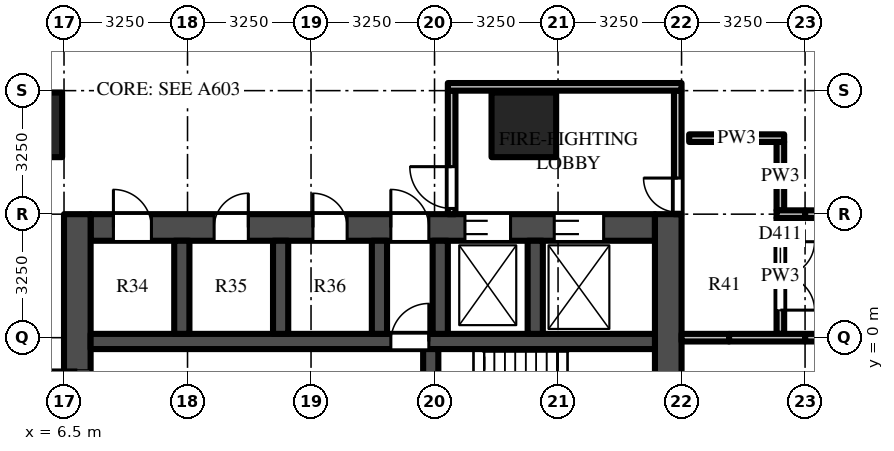
"""IFC4 building model, lengths in metres.
Left out: names, types, materials, properties, quantities, classifications, styles, units other than length and angle.
Written with IfcOpenShell. Run it as: python <this file> out.ifc"""

import sys

from ifc_helpers import new_model, si_unit, direction, frame, frame_2d, origin, origin_2d, place, context, subcontext, project, spatial, rectangle, extrude, source, transform, mapped, element, fill, save


model = new_model("IFC4")
c1 = context("Model", 3, precision=1e-05, world=origin(), true_north=direction((0.0, 1.0)))
c2 = subcontext(c1, "Body", "Model", "MODEL_VIEW")
j1 = project(units=[si_unit("LENGTHUNIT", "METRE"), si_unit("PLANEANGLEUNIT", "RADIAN")], contexts=[c1])
p1 = place(None, origin())
s1 = spatial("IfcSite", under=j1, at=p1, CompositionType="ELEMENT")
p2 = place(p1, origin())
s2 = spatial("IfcBuilding", under=s1, at=p2, CompositionType="ELEMENT")
p3 = place(p2, frame((0.0, 0.0, 14.0)))
s3 = spatial("IfcBuildingStorey", under=s2, at=p3, CompositionType="ELEMENT", Elevation=14.0)
m1 = source(origin(), c2, "Body", "SweptSolid", [
    extrude(rectangle(XDim=1.7, YDim=1.7, at=origin_2d()), origin(), (0.0, 0.0, 1.0), 5.0),
])
for number, where, z_axis, x_axis in (
    (1, (5.6, 5.6, 0.0), (0.0, 0.0, 1.0), (1.0, 0.0, 0.0)),
    (2, (18.6, 5.6, 0.0), (0.0, 0.0, 1.0), (1.0, 0.0, 0.0)),
):
    element("IfcColumn", number, at=place(p3, frame(where, z_axis=z_axis, x_axis=x_axis)), inside=s3, PredefinedType="COLUMN", context=c2, shape_type="MappedRepresentation", body=[
        mapped(m1, transform((0.0, 0.0, 0.0))),
    ])
m2 = source(origin(), c2, "Body", "SweptSolid", [
    extrude(rectangle(XDim=14.85, YDim=0.7, at=frame_2d((7.425, 0.0))), origin(), (0.0, 0.0, 1.0), 4.7),
])
p4 = place(p3, frame((7.2, 2.9, 0.0), z_axis=(0.0, 0.0, 1.0), x_axis=(1.0, 0.0, 0.0)))
e3 = element("IfcWall", 3, at=p4, inside=s3, PredefinedType="SHEAR", context=c2, shape_type="MappedRepresentation", body=[
    mapped(m2, transform((0.0, 0.0, 0.0))),
])
m3 = source(origin(), c2, "Body", "SweptSolid", [
    extrude(rectangle(XDim=1.3, YDim=2.1, at=frame_2d((0.65, 1.05))), frame((0.0, 0.36, 0.0), z_axis=(0.0, -1.0, 0.0), x_axis=(1.0, 0.0, 0.0)), (0.0, 0.0, 1.0), 0.72),
])
p5 = place(p4, frame((12.2, 0.0, 0.0)))
e4 = element("IfcOpeningElement", 4, at=p5, cuts=e3, PredefinedType="OPENING", context=c2, shape_type="MappedRepresentation", body=[
    mapped(m3, transform((0.0, 0.0, 0.0))),
])
m4 = source(origin(), c2, "Body", "SweptSolid", [
    extrude(rectangle(XDim=1.2, YDim=2.1, at=frame_2d((0.6, 1.05))), frame((0.0, 0.36, 0.0), z_axis=(0.0, -1.0, 0.0), x_axis=(1.0, 0.0, 0.0)), (0.0, 0.0, 1.0), 0.72),
])
p6 = place(p4, frame((9.85, 0.0, 0.0)))
e5 = element("IfcOpeningElement", 5, at=p6, cuts=e3, PredefinedType="OPENING", context=c2, shape_type="MappedRepresentation", body=[
    mapped(m4, transform((0.0, 0.0, 0.0))),
])
m5 = source(origin(), c2, "Body", "SweptSolid", [
    extrude(rectangle(XDim=1.0, YDim=2.1, at=frame_2d((0.5, 1.05))), frame((0.0, 0.36, 0.0), z_axis=(0.0, -1.0, 0.0), x_axis=(1.0, 0.0, 0.0)), (0.0, 0.0, 1.0), 0.72),
])
p7 = place(p4, frame((7.9, 0.0, 0.0)))
e6 = element("IfcOpeningElement", 6, at=p7, cuts=e3, PredefinedType="OPENING", context=c2, shape_type="MappedRepresentation", body=[
    mapped(m5, transform((0.0, 0.0, 0.0))),
])
p8 = place(p4, frame((0.6, 0.0, 0.0)))
e7 = element("IfcOpeningElement", 7, at=p8, cuts=e3, PredefinedType="OPENING", context=c2, shape_type="MappedRepresentation", body=[
    mapped(m5, transform((0.0, 0.0, 0.0))),
])
m6 = source(origin(), c2, "Body", "SweptSolid", [
    extrude(rectangle(XDim=0.9, YDim=2.1, at=frame_2d((0.45, 1.05))), frame((0.0, 0.36, 0.0), z_axis=(0.0, -1.0, 0.0), x_axis=(1.0, 0.0, 0.0)), (0.0, 0.0, 1.0), 0.72),
])
p9 = place(p4, frame((3.25, 0.0, 0.0)))
e8 = element("IfcOpeningElement", 8, at=p9, cuts=e3, PredefinedType="OPENING", context=c2, shape_type="MappedRepresentation", body=[
    mapped(m6, transform((0.0, 0.0, 0.0))),
])
p10 = place(p4, frame((5.85, 0.0, 0.0)))
e9 = element("IfcOpeningElement", 9, at=p10, cuts=e3, PredefinedType="OPENING", context=c2, shape_type="MappedRepresentation", body=[
    mapped(m6, transform((0.0, 0.0, 0.0))),
])
m7 = source(origin(), c2, "Body", "SweptSolid", [
    extrude(rectangle(XDim=9.05, YDim=0.7, at=frame_2d((4.525, 0.0))), origin(), (0.0, 0.0, 1.0), 4.7),
])
p11 = place(p3, frame((6.85, -5.8, 0.0), z_axis=(0.0, 0.0, 1.0), x_axis=(0.0, 1.0, 0.0)))
e10 = element("IfcWall", 10, at=p11, inside=s3, PredefinedType="SHEAR", context=c2, shape_type="MappedRepresentation", body=[
    mapped(m7, transform((0.0, 0.0, 0.0))),
])
m8 = source(origin(), c2, "Body", "SweptSolid", [
    extrude(rectangle(XDim=1.8, YDim=2.1, at=frame_2d((0.9, 1.05))), frame((0.0, 0.36, 0.0), z_axis=(0.0, -1.0, 0.0), x_axis=(1.0, 0.0, 0.0)), (0.0, 0.0, 1.0), 0.72),
])
p12 = place(p11, frame((3.15, 0.0, 0.0)))
e11 = element("IfcOpeningElement", 11, at=p12, cuts=e10, PredefinedType="OPENING", context=c2, shape_type="MappedRepresentation", body=[
    mapped(m8, transform((0.0, 0.0, 0.0))),
])
p13 = place(p3, frame((22.4, -5.8, 0.0), z_axis=(0.0, 0.0, 1.0), x_axis=(0.0, 1.0, 0.0)))
e12 = element("IfcWall", 12, at=p13, inside=s3, PredefinedType="SHEAR", context=c2, shape_type="MappedRepresentation", body=[
    mapped(m7, transform((0.0, 0.0, 0.0))),
])
m9 = source(origin(), c2, "Body", "SweptSolid", [
    extrude(rectangle(XDim=14.85, YDim=0.4, at=frame_2d((7.425, 0.0))), origin(), (0.0, 0.0, 1.0), 4.7),
])
p14 = place(p3, frame((7.2, -0.1, 0.0), z_axis=(0.0, 0.0, 1.0), x_axis=(1.0, 0.0, 0.0)))
e13 = element("IfcWall", 13, at=p14, inside=s3, PredefinedType="SHEAR", context=c2, shape_type="MappedRepresentation", body=[
    mapped(m9, transform((0.0, 0.0, 0.0))),
])
m10 = source(origin(), c2, "Body", "SweptSolid", [
    extrude(rectangle(XDim=1.0, YDim=2.1, at=frame_2d((0.5, 1.05))), frame((0.0, 0.21, 0.0), z_axis=(0.0, -1.0, 0.0), x_axis=(1.0, 0.0, 0.0)), (0.0, 0.0, 1.0), 0.42),
])
p15 = place(p14, frame((7.9, 0.0, 0.0)))
e14 = element("IfcOpeningElement", 14, at=p15, cuts=e13, PredefinedType="OPENING", context=c2, shape_type="MappedRepresentation", body=[
    mapped(m10, transform((0.0, 0.0, 0.0))),
])
m11 = source(origin(), c2, "Body", "SweptSolid", [
    extrude(rectangle(XDim=5.5, YDim=0.4, at=frame_2d((2.75, 0.0))), origin(), (0.0, 0.0, 1.0), 4.7),
])
p16 = place(p3, frame((16.15, -5.8, 0.0), z_axis=(0.0, 0.0, 1.0), x_axis=(0.0, 1.0, 0.0)))
e15 = element("IfcWall", 15, at=p16, inside=s3, PredefinedType="SHEAR", context=c2, shape_type="MappedRepresentation", body=[
    mapped(m11, transform((0.0, 0.0, 0.0))),
])
m12 = source(origin(), c2, "Body", "SweptSolid", [
    extrude(rectangle(XDim=1.1, YDim=2.1, at=frame_2d((0.55, 1.05))), frame((0.0, 0.21, 0.0), z_axis=(0.0, -1.0, 0.0), x_axis=(1.0, 0.0, 0.0)), (0.0, 0.0, 1.0), 0.42),
])
p17 = place(p16, frame((0.725, 0.0, 0.0)))
e16 = element("IfcOpeningElement", 16, at=p17, cuts=e15, PredefinedType="OPENING", context=c2, shape_type="MappedRepresentation", body=[
    mapped(m12, transform((0.0, 0.0, 0.0))),
])
p18 = place(p16, frame((3.675, 0.0, 0.0)))
e17 = element("IfcOpeningElement", 17, at=p18, cuts=e15, PredefinedType="OPENING", context=c2, shape_type="MappedRepresentation", body=[
    mapped(m12, transform((0.0, 0.0, 0.0))),
])
m13 = source(origin(), c2, "Body", "SweptSolid", [
    extrude(rectangle(XDim=2.45, YDim=0.4, at=frame_2d((1.225, 0.0))), origin(), (0.0, 0.0, 1.0), 4.7),
])
for number, where, z_axis, x_axis in (
    (18, (9.6, 0.1, 0.0), (0.0, 0.0, 1.0), (0.0, 1.0, 0.0)),
    (19, (12.2, 0.1, 0.0), (0.0, 0.0, 1.0), (0.0, 1.0, 0.0)),
    (20, (14.8, 0.1, 0.0), (0.0, 0.0, 1.0), (0.0, 1.0, 0.0)),
    (21, (16.4, 0.1, 0.0), (0.0, 0.0, 1.0), (0.0, 1.0, 0.0)),
    (22, (18.9, 0.1, 0.0), (0.0, 0.0, 1.0), (0.0, 1.0, 0.0)),
):
    element("IfcWall", number, at=place(p3, frame(where, z_axis=z_axis, x_axis=x_axis)), inside=s3, PredefinedType="SHEAR", context=c2, shape_type="MappedRepresentation", body=[
        mapped(m13, transform((0.0, 0.0, 0.0))),
    ])
m14 = source(origin(), c2, "Body", "SweptSolid", [
    extrude(rectangle(XDim=3.25, YDim=0.2, at=frame_2d((1.625, 0.0))), origin(), (0.0, 0.0, 1.0), 4.7),
])
p19 = place(p3, frame((16.7, 3.25, 0.0), z_axis=(0.0, 0.0, 1.0), x_axis=(0.0, 1.0, 0.0)))
e23 = element("IfcWall", 23, at=p19, inside=s3, PredefinedType="PARTITIONING", context=c2, shape_type="MappedRepresentation", body=[
    mapped(m14, transform((0.0, 0.0, 0.0))),
])
m15 = source(origin(), c2, "Body", "SweptSolid", [
    extrude(rectangle(XDim=1.1, YDim=2.1, at=frame_2d((0.55, 1.05))), frame((0.0, 0.11, 0.0), z_axis=(0.0, -1.0, 0.0), x_axis=(1.0, 0.0, 0.0)), (0.0, 0.0, 1.0), 0.22),
])
p20 = place(p19, frame((0.15, 0.0, 0.0)))
e24 = element("IfcOpeningElement", 24, at=p20, cuts=e23, PredefinedType="OPENING", context=c2, shape_type="MappedRepresentation", body=[
    mapped(m15, transform((0.0, 0.0, 0.0))),
])
p21 = place(p3, frame((22.65, 3.25, 0.0), z_axis=(0.0, 0.0, 1.0), x_axis=(0.0, 1.0, 0.0)))
e25 = element("IfcWall", 25, at=p21, inside=s3, PredefinedType="PARTITIONING", context=c2, shape_type="MappedRepresentation", body=[
    mapped(m14, transform((0.0, 0.0, 0.0))),
])
m16 = source(origin(), c2, "Body", "SweptSolid", [
    extrude(rectangle(XDim=0.9, YDim=2.1, at=frame_2d((0.45, 1.05))), frame((0.0, 0.11, 0.0), z_axis=(0.0, -1.0, 0.0), x_axis=(1.0, 0.0, 0.0)), (0.0, 0.0, 1.0), 0.22),
])
p22 = place(p21, frame((0.05, 0.0, 0.0)))
e26 = element("IfcOpeningElement", 26, at=p22, cuts=e25, PredefinedType="OPENING", context=c2, shape_type="MappedRepresentation", body=[
    mapped(m16, transform((0.0, 0.0, 0.0))),
])
m17 = source(origin(), c2, "Body", "SweptSolid", [
    extrude(rectangle(XDim=6.15, YDim=0.2, at=frame_2d((3.075, 0.0))), origin(), (0.0, 0.0, 1.0), 4.7),
])
p23 = place(p3, frame((16.6, 6.6, 0.0), z_axis=(0.0, 0.0, 1.0), x_axis=(1.0, 0.0, 0.0)))
e27 = element("IfcWall", 27, at=p23, inside=s3, PredefinedType="PARTITIONING", context=c2, shape_type="MappedRepresentation", body=[
    mapped(m17, transform((0.0, 0.0, 0.0))),
])
m18 = source(origin(), c2, "Body", "SweptSolid", [
    extrude(rectangle(XDim=3.05, YDim=0.2, at=frame_2d((1.525, 0.0))), origin(), (0.0, 0.0, 1.0), 4.077),
])
p24 = place(p3, frame((25.35, 3.15, 0.0), z_axis=(0.0, 0.0, 1.0), x_axis=(0.0, -1.0, 0.0)))
e28 = element("IfcWall", 28, at=p24, inside=s3, PredefinedType="PARTITIONING", context=c2, shape_type="MappedRepresentation", body=[
    mapped(m18, transform((0.0, 0.0, 0.0))),
])
m19 = source(origin(), c2, "Body", "SweptSolid", [
    extrude(rectangle(XDim=1.8, YDim=2.1, at=frame_2d((0.9, 1.05))), frame((0.0, 0.11, 0.0), z_axis=(0.0, -1.0, 0.0), x_axis=(1.0, 0.0, 0.0)), (0.0, 0.0, 1.0), 0.22),
])
p25 = place(p24, frame((0.625, 0.0, 0.0)))
e29 = element("IfcOpeningElement", 29, at=p25, cuts=e28, PredefinedType="OPENING", context=c2, shape_type="MappedRepresentation", body=[
    mapped(m19, transform((0.0, 0.0, 0.0))),
])
m20 = source(origin(), c2, "Body", "SweptSolid", [
    extrude(rectangle(XDim=1.8, YDim=0.2, at=frame_2d((0.9, 0.0))), origin(), (0.0, 0.0, 1.0), 4.7),
])
p26 = place(p3, frame((25.35, 3.35, 0.0), z_axis=(0.0, 0.0, 1.0), x_axis=(0.0, 1.0, 0.0)))
e30 = element("IfcWall", 30, at=p26, inside=s3, PredefinedType="PARTITIONING", context=c2, shape_type="MappedRepresentation", body=[
    mapped(m20, transform((0.0, 0.0, 0.0))),
])
m21 = source(origin(), c2, "Body", "SweptSolid", [
    extrude(rectangle(XDim=1.25, YDim=0.2, at=frame_2d((0.625, 0.0))), origin(), (0.0, 0.0, 1.0), 4.077),
])
p27 = place(p3, frame((22.75, 0.0, 0.0), z_axis=(0.0, 0.0, 1.0), x_axis=(1.0, 0.0, 0.0)))
e31 = element("IfcWall", 31, at=p27, inside=s3, PredefinedType="PARTITIONING", context=c2, shape_type="MappedRepresentation", body=[
    mapped(m21, transform((0.0, 0.0, 0.0))),
])
m22 = source(origin(), c2, "Body", "SweptSolid", [
    extrude(rectangle(XDim=3.25, YDim=0.2, at=frame_2d((1.625, 0.0))), origin(), (0.0, 0.0, 1.0), 4.077),
])
p28 = place(p3, frame((29.25, 0.0, 0.0), z_axis=(0.0, 0.0, 1.0), x_axis=(-1.0, 0.0, 0.0)))
e32 = element("IfcWall", 32, at=p28, inside=s3, PredefinedType="PARTITIONING", context=c2, shape_type="MappedRepresentation", body=[
    mapped(m22, transform((0.0, 0.0, 0.0))),
])
p29 = place(p28, frame((0.725, 0.0, 0.0)))
e33 = element("IfcOpeningElement", 33, at=p29, cuts=e32, PredefinedType="OPENING", context=c2, shape_type="MappedRepresentation", body=[
    mapped(m19, transform((0.0, 0.0, 0.0))),
])
m23 = source(origin(), c2, "Body", "SweptSolid", [
    extrude(rectangle(XDim=2.0, YDim=0.2, at=frame_2d((1.0, 0.0))), origin(), (0.0, 0.0, 1.0), 4.077),
])
p30 = place(p3, frame((26.0, 0.0, 0.0), z_axis=(0.0, 0.0, 1.0), x_axis=(-1.0, 0.0, 0.0)))
e34 = element("IfcWall", 34, at=p30, inside=s3, PredefinedType="PARTITIONING", context=c2, shape_type="MappedRepresentation", body=[
    mapped(m23, transform((0.0, 0.0, 0.0))),
])
p31 = place(p3, frame((26.0, 3.25, 0.0), z_axis=(0.0, 0.0, 1.0), x_axis=(1.0, 0.0, 0.0)))
e35 = element("IfcWall", 35, at=p31, inside=s3, PredefinedType="PARTITIONING", context=c2, shape_type="MappedRepresentation", body=[
    mapped(m14, transform((0.0, 0.0, 0.0))),
])
p32 = place(p31, frame((0.725, 0.0, 0.0)))
e36 = element("IfcOpeningElement", 36, at=p32, cuts=e35, PredefinedType="OPENING", context=c2, shape_type="MappedRepresentation", body=[
    mapped(m19, transform((0.0, 0.0, 0.0))),
])
m24 = source(origin(), c2, "Body", "SweptSolid", [
    extrude(rectangle(XDim=0.75, YDim=0.2, at=frame_2d((0.375, 0.0))), origin(), (0.0, 0.0, 1.0), 4.7),
])
p33 = place(p3, frame((25.25, 3.25, 0.0), z_axis=(0.0, 0.0, 1.0), x_axis=(1.0, 0.0, 0.0)))
e37 = element("IfcWall", 37, at=p33, inside=s3, PredefinedType="PARTITIONING", context=c2, shape_type="MappedRepresentation", body=[
    mapped(m24, transform((0.0, 0.0, 0.0))),
])
m25 = source(origin(), c2, "Body", "SweptSolid", [
    extrude(rectangle(XDim=1.05, YDim=0.2, at=frame_2d((0.525, 0.0))), origin(), (0.0, 0.0, 1.0), 4.7),
])
p34 = place(p3, frame((22.95, 5.25, 0.0), z_axis=(0.0, 0.0, 1.0), x_axis=(1.0, 0.0, 0.0)))
e38 = element("IfcWall", 38, at=p34, inside=s3, PredefinedType="PARTITIONING", context=c2, shape_type="MappedRepresentation", body=[
    mapped(m25, transform((0.0, 0.0, 0.0))),
])
m26 = source(origin(), c2, "Body", "SweptSolid", [
    extrude(rectangle(XDim=1.45, YDim=0.2, at=frame_2d((0.725, 0.0))), origin(), (0.0, 0.0, 1.0), 4.7),
])
p35 = place(p3, frame((24.0, 5.25, 0.0), z_axis=(0.0, 0.0, 1.0), x_axis=(1.0, 0.0, 0.0)))
e39 = element("IfcWall", 39, at=p35, inside=s3, PredefinedType="PARTITIONING", context=c2, shape_type="MappedRepresentation", body=[
    mapped(m26, transform((0.0, 0.0, 0.0))),
])
m27 = source(origin(), c2, "Body", "SweptSolid", [
    extrude(rectangle(XDim=1.3, YDim=2.1, at=frame_2d((0.65, 1.05))), frame((0.0, -0.275, 0.0), z_axis=(0.0, -1.0, 0.0), x_axis=(1.0, 0.0, 0.0)), (0.0, 0.0, 1.0), 0.05),
])
p36 = place(p5, origin())
e40 = element("IfcDoor", 40, at=p36, inside=s3, OperationType="DOUBLE_DOOR_SLIDING", PredefinedType="DOOR", context=c2, shape_type="MappedRepresentation", body=[
    mapped(m27, transform((0.0, 0.0, 0.0))),
])
fill(e4, e40)
m28 = source(origin(), c2, "Body", "SweptSolid", [
    extrude(rectangle(XDim=1.2, YDim=2.1, at=frame_2d((0.6, 1.05))), frame((0.0, -0.275, 0.0), z_axis=(0.0, -1.0, 0.0), x_axis=(1.0, 0.0, 0.0)), (0.0, 0.0, 1.0), 0.05),
])
p37 = place(p6, origin())
e41 = element("IfcDoor", 41, at=p37, inside=s3, OperationType="DOUBLE_DOOR_SLIDING", PredefinedType="DOOR", context=c2, shape_type="MappedRepresentation", body=[
    mapped(m28, transform((0.0, 0.0, 0.0))),
])
fill(e5, e41)
m29 = source(origin(), c2, "Body", "SweptSolid", [
    extrude(rectangle(XDim=1.8, YDim=2.1, at=frame_2d((0.9, 1.05))), frame((0.0, -0.275, 0.0), z_axis=(0.0, -1.0, 0.0), x_axis=(1.0, 0.0, 0.0)), (0.0, 0.0, 1.0), 0.05),
])
p38 = place(p12, origin())
e42 = element("IfcDoor", 42, at=p38, inside=s3, OperationType="DOUBLE_DOOR_SINGLE_SWING", PredefinedType="DOOR", context=c2, shape_type="MappedRepresentation", body=[
    mapped(m29, transform((0.0, 0.0, 0.0))),
])
fill(e11, e42)
m30 = source(origin(), c2, "Body", "SweptSolid", [
    extrude(rectangle(XDim=1.0, YDim=2.1, at=frame_2d((0.5, 1.05))), frame((0.0, 0.025, 0.0), z_axis=(0.0, -1.0, 0.0), x_axis=(1.0, 0.0, 0.0)), (0.0, 0.0, 1.0), 0.05),
])
p39 = place(p15, origin())
e43 = element("IfcDoor", 43, at=p39, inside=s3, OperationType="SINGLE_SWING_RIGHT", PredefinedType="DOOR", context=c2, shape_type="MappedRepresentation", body=[
    mapped(m30, transform((0.0, 0.0, 0.0))),
])
fill(e14, e43)
m31 = source(origin(), c2, "Body", "SweptSolid", [
    extrude(rectangle(XDim=1.0, YDim=2.1, at=frame_2d((0.5, 1.05))), frame((0.0, -0.275, 0.0), z_axis=(0.0, -1.0, 0.0), x_axis=(1.0, 0.0, 0.0)), (0.0, 0.0, 1.0), 0.05),
])
p40 = place(p7, origin())
e44 = element("IfcDoor", 44, at=p40, inside=s3, OperationType="SINGLE_SWING_LEFT", PredefinedType="DOOR", context=c2, shape_type="MappedRepresentation", body=[
    mapped(m31, transform((0.0, 0.0, 0.0))),
])
fill(e6, e44)
m32 = source(origin(), c2, "Body", "SweptSolid", [
    extrude(rectangle(XDim=1.1, YDim=2.1, at=frame_2d((0.55, 1.05))), frame((0.0, 0.025, 0.0), z_axis=(0.0, -1.0, 0.0), x_axis=(1.0, 0.0, 0.0)), (0.0, 0.0, 1.0), 0.05),
])
p41 = place(p20, origin())
e45 = element("IfcDoor", 45, at=p41, inside=s3, OperationType="SINGLE_SWING_RIGHT", PredefinedType="DOOR", context=c2, shape_type="MappedRepresentation", body=[
    mapped(m32, transform((0.0, 0.0, 0.0))),
])
fill(e24, e45)
m33 = source(origin(), c2, "Body", "SweptSolid", [
    extrude(rectangle(XDim=0.9, YDim=2.1, at=frame_2d((0.45, 1.05))), frame((0.0, 0.025, 0.0), z_axis=(0.0, -1.0, 0.0), x_axis=(1.0, 0.0, 0.0)), (0.0, 0.0, 1.0), 0.05),
])
p42 = place(p22, origin())
e46 = element("IfcDoor", 46, at=p42, inside=s3, OperationType="SINGLE_SWING_RIGHT", PredefinedType="DOOR", context=c2, shape_type="MappedRepresentation", body=[
    mapped(m33, transform((0.0, 0.0, 0.0))),
])
fill(e26, e46)
p43 = place(p8, origin())
e47 = element("IfcDoor", 47, at=p43, inside=s3, OperationType="SINGLE_SWING_LEFT", PredefinedType="DOOR", context=c2, shape_type="MappedRepresentation", body=[
    mapped(m31, transform((0.0, 0.0, 0.0))),
])
fill(e7, e47)
m34 = source(origin(), c2, "Body", "SweptSolid", [
    extrude(rectangle(XDim=0.9, YDim=2.1, at=frame_2d((0.45, 1.05))), frame((0.0, -0.275, 0.0), z_axis=(0.0, -1.0, 0.0), x_axis=(1.0, 0.0, 0.0)), (0.0, 0.0, 1.0), 0.05),
])
p44 = place(p9, origin())
e48 = element("IfcDoor", 48, at=p44, inside=s3, OperationType="SINGLE_SWING_RIGHT", PredefinedType="DOOR", context=c2, shape_type="MappedRepresentation", body=[
    mapped(m34, transform((0.0, 0.0, 0.0))),
])
fill(e8, e48)
p45 = place(p10, origin())
e49 = element("IfcDoor", 49, at=p45, inside=s3, OperationType="SINGLE_SWING_LEFT", PredefinedType="DOOR", context=c2, shape_type="MappedRepresentation", body=[
    mapped(m34, transform((0.0, 0.0, 0.0))),
])
fill(e9, e49)
m35 = source(origin(), c2, "Body", "SweptSolid", [
    extrude(rectangle(XDim=1.8, YDim=2.1, at=frame_2d((0.9, 1.05))), frame((0.0, 0.025, 0.0), z_axis=(0.0, -1.0, 0.0), x_axis=(1.0, 0.0, 0.0)), (0.0, 0.0, 1.0), 0.05),
])
p46 = place(p25, origin())
e50 = element("IfcDoor", 50, at=p46, inside=s3, OperationType="DOUBLE_DOOR_SINGLE_SWING", PredefinedType="DOOR", context=c2, shape_type="MappedRepresentation", body=[
    mapped(m35, transform((0.0, 0.0, 0.0))),
])
fill(e29, e50)
save(model, sys.argv[1])
